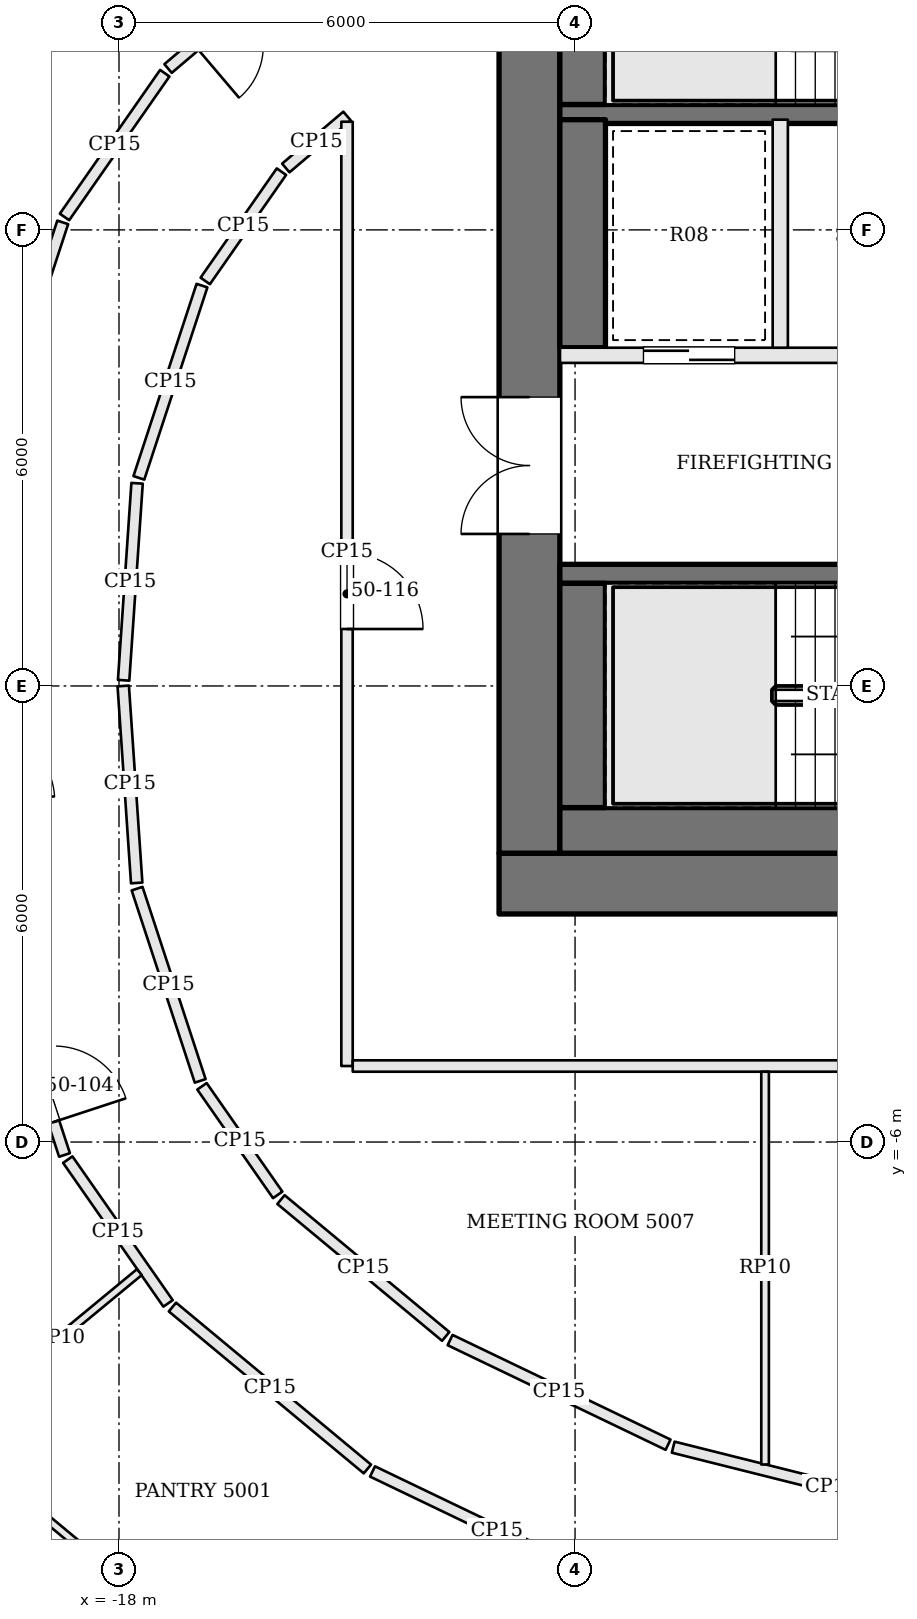
"""IFC4 building model, lengths in metres.
Left out: names, types, materials, properties, quantities, classifications, styles, units other than length and angle.
Written with IfcOpenShell. Run it as: python <this file> out.ifc"""

import sys

from ifc_helpers import new_model, si_unit, direction, frame, frame_2d, origin, place, context, subcontext, project, spatial, rectangle, extrude, element, fill, save


model = new_model("IFC4")
c1 = context("Model", 3, precision=1e-05, world=origin(), true_north=direction((0.0, 1.0)))
c2 = subcontext(c1, "Body", "Model", "MODEL_VIEW")
j1 = project(units=[si_unit("LENGTHUNIT", "METRE"), si_unit("PLANEANGLEUNIT", "RADIAN")], contexts=[c1])
p1 = place(None, origin())
s1 = spatial("IfcSite", under=j1, at=p1, CompositionType="ELEMENT")
p2 = place(p1, origin())
s2 = spatial("IfcBuilding", under=s1, at=p2, CompositionType="ELEMENT")
p3 = place(p2, frame((0.0, 0.0, 205.2)))
s3 = spatial("IfcBuildingStorey", under=s2, at=p3, CompositionType="ELEMENT", Elevation=205.2)
p4 = place(p3, frame((-13.0, -2.6, 0.0), z_axis=(0.0, 0.0, 1.0), x_axis=(1.0, 0.0, 0.0)))
e1 = element("IfcWall", 1, at=p4, inside=s3, PredefinedType="SHEAR", context=c2, shape_type="SweptSolid", body=[
    extrude(rectangle(XDim=26.0, YDim=0.8, at=frame_2d((13.0, 0.0))), origin(), (0.0, 0.0, 1.0), 3.9),
])
p5 = place(p4, frame((8.925, 0.0, 0.0)))
e2 = element("IfcOpeningElement", 2, at=p5, cuts=e1, PredefinedType="OPENING", context=c2, shape_type="SweptSolid", body=[
    extrude(rectangle(XDim=0.9, YDim=2.1, at=frame_2d((0.45, 1.05))), frame((0.0, 0.41, 0.0), z_axis=(0.0, -1.0, 0.0), x_axis=(1.0, 0.0, 0.0)), (0.0, 0.0, 1.0), 0.82),
])
p6 = place(p4, frame((11.475, 0.0, 0.0)))
e3 = element("IfcOpeningElement", 3, at=p6, cuts=e1, PredefinedType="OPENING", context=c2, shape_type="SweptSolid", body=[
    extrude(rectangle(XDim=0.9, YDim=2.1, at=frame_2d((0.45, 1.05))), frame((0.0, 0.41, 0.0), z_axis=(0.0, -1.0, 0.0), x_axis=(1.0, 0.0, 0.0)), (0.0, 0.0, 1.0), 0.82),
])
p7 = place(p4, frame((13.6, 0.0, 0.0)))
e4 = element("IfcOpeningElement", 4, at=p7, cuts=e1, PredefinedType="OPENING", context=c2, shape_type="SweptSolid", body=[
    extrude(rectangle(XDim=1.0, YDim=2.1, at=frame_2d((0.5, 1.05))), frame((0.0, 0.41, 0.0), z_axis=(0.0, -1.0, 0.0), x_axis=(1.0, 0.0, 0.0)), (0.0, 0.0, 1.0), 0.82),
])
p8 = place(p4, frame((15.95, 0.0, 0.0)))
e5 = element("IfcOpeningElement", 5, at=p8, cuts=e1, PredefinedType="OPENING", context=c2, shape_type="SweptSolid", body=[
    extrude(rectangle(XDim=1.0, YDim=2.1, at=frame_2d((0.5, 1.05))), frame((0.0, 0.41, 0.0), z_axis=(0.0, -1.0, 0.0), x_axis=(1.0, 0.0, 0.0)), (0.0, 0.0, 1.0), 0.82),
])
p9 = place(p3, frame((-12.6, -2.2, 0.0), z_axis=(0.0, 0.0, 1.0), x_axis=(0.0, 1.0, 0.0)))
e6 = element("IfcWall", 6, at=p9, inside=s3, PredefinedType="SHEAR", context=c2, shape_type="SweptSolid", body=[
    extrude(rectangle(XDim=13.4, YDim=0.8, at=frame_2d((6.7, 0.0))), origin(), (0.0, 0.0, 1.0), 3.9),
])
p10 = place(p9, frame((4.2, 0.0, 0.0)))
e7 = element("IfcOpeningElement", 7, at=p10, cuts=e6, PredefinedType="OPENING", context=c2, shape_type="SweptSolid", body=[
    extrude(rectangle(XDim=1.8, YDim=2.1, at=frame_2d((0.9, 1.05))), frame((0.0, 0.41, 0.0), z_axis=(0.0, -1.0, 0.0), x_axis=(1.0, 0.0, 0.0)), (0.0, 0.0, 1.0), 0.82),
])
p11 = place(p3, frame((-12.2, 1.475, 0.0), z_axis=(0.0, 0.0, 1.0), x_axis=(1.0, 0.0, 0.0)))
e8 = element("IfcWall", 8, at=p11, inside=s3, PredefinedType="SOLIDWALL", context=c2, shape_type="SweptSolid", body=[
    extrude(rectangle(XDim=7.1, YDim=0.25, at=frame_2d((3.55, 0.0))), origin(), (0.0, 0.0, 1.0), 3.7),
])
p12 = place(p11, frame((5.8, 0.0, 0.0)))
e9 = element("IfcOpeningElement", 9, at=p12, cuts=e8, PredefinedType="OPENING", context=c2, shape_type="SweptSolid", body=[
    extrude(rectangle(XDim=1.2, YDim=2.1, at=frame_2d((0.6, 1.05))), frame((0.0, 0.135, 0.0), z_axis=(0.0, -1.0, 0.0), x_axis=(1.0, 0.0, 0.0)), (0.0, 0.0, 1.0), 0.27),
])
p13 = place(p3, frame((-12.2, 4.35, 0.0), z_axis=(0.0, 0.0, 1.0), x_axis=(1.0, 0.0, 0.0)))
e10 = element("IfcWall", 10, at=p13, inside=s3, PredefinedType="SOLIDWALL", context=c2, shape_type="SweptSolid", body=[
    extrude(rectangle(XDim=7.1, YDim=0.2, at=frame_2d((3.55, 0.0))), origin(), (0.0, 0.0, 1.0), 3.7),
])
p14 = place(p13, frame((4.4, 0.0, 0.0)))
e11 = element("IfcOpeningElement", 11, at=p14, cuts=e10, PredefinedType="OPENING", context=c2, shape_type="SweptSolid", body=[
    extrude(rectangle(XDim=1.2, YDim=2.1, at=frame_2d((0.6, 1.05))), frame((0.0, 0.11, 0.0), z_axis=(0.0, -1.0, 0.0), x_axis=(1.0, 0.0, 0.0)), (0.0, 0.0, 1.0), 0.22),
])
p15 = place(p13, frame((1.1, 0.0, 0.0)))
e12 = element("IfcOpeningElement", 12, at=p15, cuts=e10, PredefinedType="OPENING", context=c2, shape_type="SweptSolid", body=[
    extrude(rectangle(XDim=1.2, YDim=2.1, at=frame_2d((0.6, 1.05))), frame((0.0, 0.11, 0.0), z_axis=(0.0, -1.0, 0.0), x_axis=(1.0, 0.0, 0.0)), (0.0, 0.0, 1.0), 0.22),
])
p16 = place(p3, frame((-12.2, 7.525, 0.0), z_axis=(0.0, 0.0, 1.0), x_axis=(1.0, 0.0, 0.0)))
e13 = element("IfcWall", 13, at=p16, inside=s3, PredefinedType="SOLIDWALL", context=c2, shape_type="SweptSolid", body=[
    extrude(rectangle(XDim=7.1, YDim=0.25, at=frame_2d((3.55, 0.0))), origin(), (0.0, 0.0, 1.0), 3.7),
])
p17 = place(p16, frame((5.8, 0.0, 0.0)))
e14 = element("IfcOpeningElement", 14, at=p17, cuts=e13, PredefinedType="OPENING", context=c2, shape_type="SweptSolid", body=[
    extrude(rectangle(XDim=1.2, YDim=2.1, at=frame_2d((0.6, 1.05))), frame((0.0, 0.135, 0.0), z_axis=(0.0, -1.0, 0.0), x_axis=(1.0, 0.0, 0.0)), (0.0, 0.0, 1.0), 0.27),
])
p18 = place(p3, frame((-9.3, 4.45, 0.0), z_axis=(0.0, 0.0, 1.0), x_axis=(0.0, 1.0, 0.0)))
e15 = element("IfcWall", 15, at=p18, inside=s3, PredefinedType="SOLIDWALL", context=c2, shape_type="SweptSolid", body=[
    extrude(rectangle(XDim=3.0, YDim=0.2, at=frame_2d((1.5, 0.0))), origin(), (0.0, 0.0, 1.0), 3.7),
])
p19 = place(p3, frame((-12.2, -1.9, 0.0), z_axis=(0.0, 0.0, 1.0), x_axis=(1.0, 0.0, 0.0)))
e16 = element("IfcWall", 16, at=p19, inside=s3, PredefinedType="SOLIDWALL", context=c2, shape_type="SweptSolid", body=[
    extrude(rectangle(XDim=7.1, YDim=0.6, at=frame_2d((3.55, 0.0))), origin(), (0.0, 0.0, 1.0), 3.7),
])
p20 = place(p3, frame((-11.9, -1.6, 0.0), z_axis=(0.0, 0.0, 1.0), x_axis=(0.0, 1.0, 0.0)))
e17 = element("IfcWall", 17, at=p20, inside=s3, PredefinedType="SOLIDWALL", context=c2, shape_type="SweptSolid", body=[
    extrude(rectangle(XDim=2.95, YDim=0.6, at=frame_2d((1.475, 0.0))), origin(), (0.0, 0.0, 1.0), 3.7),
])
p21 = place(p3, frame((-11.9, 4.45, 0.0), z_axis=(0.0, 0.0, 1.0), x_axis=(0.0, 1.0, 0.0)))
e18 = element("IfcWall", 18, at=p21, inside=s3, PredefinedType="SOLIDWALL", context=c2, shape_type="SweptSolid", body=[
    extrude(rectangle(XDim=3.0, YDim=0.6, at=frame_2d((1.5, 0.0))), origin(), (0.0, 0.0, 1.0), 3.7),
])
p22 = place(p3, frame((-11.9, 7.65, 0.0), z_axis=(0.0, 0.0, 1.0), x_axis=(0.0, 1.0, 0.0)))
e19 = element("IfcWall", 19, at=p22, inside=s3, PredefinedType="SOLIDWALL", context=c2, shape_type="SweptSolid", body=[
    extrude(rectangle(XDim=2.95, YDim=0.6, at=frame_2d((1.475, 0.0))), origin(), (0.0, 0.0, 1.0), 3.7),
])
p23 = place(p3, frame((-15.057, 10.073, 0.0), z_axis=(0.0, 0.0, 1.0), x_axis=(-0.762398905861, -0.647107339119, 0.0)))
e20 = element("IfcWall", 20, at=p23, inside=s3, PredefinedType="PARTITIONING", context=c2, shape_type="SweptSolid", body=[
    extrude(rectangle(XDim=3.013, YDim=0.15, at=frame_2d((1.507, 0.0))), origin(), (0.0, 0.0, 1.0), 3.084),
])
p24 = place(p23, frame((0.75, 0.0, 0.0)))
e21 = element("IfcOpeningElement", 21, at=p24, cuts=e20, PredefinedType="OPENING", context=c2, shape_type="SweptSolid", body=[
    extrude(rectangle(XDim=1.8, YDim=2.1, at=frame_2d((0.9, 1.05))), frame((0.0, 0.085, 0.0), z_axis=(0.0, -1.0, 0.0), x_axis=(1.0, 0.0, 0.0)), (0.0, 0.0, 1.0), 0.17),
])
p25 = place(p3, frame((-17.397, 8.062, 0.0), z_axis=(0.0, 0.0, 1.0), x_axis=(-0.572118665737, -0.820170855563, 0.0)))
e22 = element("IfcWall", 22, at=p25, inside=s3, PredefinedType="PARTITIONING", context=c2, shape_type="SweptSolid", body=[
    extrude(rectangle(XDim=2.306, YDim=0.15, at=frame_2d((1.153, 0.0))), origin(), (0.0, 0.0, 1.0), 3.084),
])
p26 = place(p3, frame((-18.74, 6.099, 0.0), z_axis=(0.0, 0.0, 1.0), x_axis=(-0.31188427026, -0.950120098706, 0.0)))
e23 = element("IfcWall", 23, at=p26, inside=s3, PredefinedType="PARTITIONING", context=c2, shape_type="SweptSolid", body=[
    extrude(rectangle(XDim=3.206, YDim=0.15, at=frame_2d((1.603, 0.0))), origin(), (0.0, 0.0, 1.0), 3.084),
])
p27 = place(p3, frame((-19.717, -3.124, 0.0), z_axis=(0.0, 0.0, 1.0), x_axis=(0.31188427026, -0.950120098706, 0.0)))
e24 = element("IfcWall", 24, at=p27, inside=s3, PredefinedType="PARTITIONING", context=c2, shape_type="SweptSolid", body=[
    extrude(rectangle(XDim=3.206, YDim=0.15, at=frame_2d((1.603, 0.0))), origin(), (0.0, 0.0, 1.0), 3.084),
])
p28 = place(p27, frame((1.75, 0.0, 0.0)))
e25 = element("IfcOpeningElement", 25, at=p28, cuts=e24, PredefinedType="OPENING", context=c2, shape_type="SweptSolid", body=[
    extrude(rectangle(XDim=1.0, YDim=2.4, at=frame_2d((0.5, 1.2))), frame((0.0, 0.085, 0.0), z_axis=(0.0, -1.0, 0.0), x_axis=(1.0, 0.0, 0.0)), (0.0, 0.0, 1.0), 0.17),
])
p29 = place(p3, frame((-18.674, -6.232, 0.0), z_axis=(0.0, 0.0, 1.0), x_axis=(0.572118665737, -0.820170855563, 0.0)))
e26 = element("IfcWall", 26, at=p29, inside=s3, PredefinedType="PARTITIONING", context=c2, shape_type="SweptSolid", body=[
    extrude(rectangle(XDim=2.306, YDim=0.15, at=frame_2d((1.153, 0.0))), origin(), (0.0, 0.0, 1.0), 3.084),
])
p30 = place(p3, frame((-17.297, -8.171, 0.0), z_axis=(0.0, 0.0, 1.0), x_axis=(0.769228575061, -0.638973707839, 0.0)))
e27 = element("IfcWall", 27, at=p30, inside=s3, PredefinedType="PARTITIONING", context=c2, shape_type="SweptSolid", body=[
    extrude(rectangle(XDim=3.334, YDim=0.15, at=frame_2d((1.667, 0.0))), origin(), (0.0, 0.0, 1.0), 3.084),
])
p31 = place(p3, frame((-14.664, -10.334, 0.0), z_axis=(0.0, 0.0, 1.0), x_axis=(0.901507315282, -0.432763862278, 0.0)))
e28 = element("IfcWall", 28, at=p31, inside=s3, PredefinedType="PARTITIONING", context=c2, shape_type="SweptSolid", body=[
    extrude(rectangle(XDim=3.63, YDim=0.15, at=frame_2d((1.815, 0.0))), origin(), (0.0, 0.0, 1.0), 3.084),
])
p32 = place(p3, frame((-6.553, -11.056, 0.0), z_axis=(0.0, 0.0, 1.0), x_axis=(-0.970004917182, 0.243085294995, 0.0)))
e29 = element("IfcWall", 29, at=p32, inside=s3, PredefinedType="PARTITIONING", context=c2, shape_type="SweptSolid", body=[
    extrude(rectangle(XDim=4.284, YDim=0.15, at=frame_2d((2.142, 0.0))), origin(), (0.0, 0.0, 1.0), 3.084),
])
p33 = place(p3, frame((-10.776, -9.982, 0.0), z_axis=(0.0, 0.0, 1.0), x_axis=(-0.901511079436, 0.432756020933, 0.0)))
e30 = element("IfcWall", 30, at=p33, inside=s3, PredefinedType="PARTITIONING", context=c2, shape_type="SweptSolid", body=[
    extrude(rectangle(XDim=3.181, YDim=0.15, at=frame_2d((1.59, 0.0))), origin(), (0.0, 0.0, 1.0), 3.084),
])
p34 = place(p3, frame((-13.702, -8.557, 0.0), z_axis=(0.0, 0.0, 1.0), x_axis=(-0.769221825067, 0.638981833733, 0.0)))
e31 = element("IfcWall", 31, at=p34, inside=s3, PredefinedType="PARTITIONING", context=c2, shape_type="SweptSolid", body=[
    extrude(rectangle(XDim=2.817, YDim=0.15, at=frame_2d((1.409, 0.0))), origin(), (0.0, 0.0, 1.0), 3.084),
])
p35 = place(p3, frame((-15.912, -6.696, 0.0), z_axis=(0.0, 0.0, 1.0), x_axis=(-0.572078533763, 0.820198848578, 0.0)))
e32 = element("IfcWall", 32, at=p35, inside=s3, PredefinedType="PARTITIONING", context=c2, shape_type="SweptSolid", body=[
    extrude(rectangle(XDim=1.742, YDim=0.15, at=frame_2d((0.871, 0.0))), origin(), (0.0, 0.0, 1.0), 3.084),
])
p36 = place(p3, frame((-16.932, -5.196, 0.0), z_axis=(0.0, 0.0, 1.0), x_axis=(-0.311904957484, 0.950113307715, 0.0)))
e33 = element("IfcWall", 33, at=p36, inside=s3, PredefinedType="PARTITIONING", context=c2, shape_type="SweptSolid", body=[
    extrude(rectangle(XDim=2.662, YDim=0.15, at=frame_2d((1.331, 0.0))), origin(), (0.0, 0.0, 1.0), 3.084),
])
p37 = place(p3, frame((-17.767, -2.592, 0.0), z_axis=(0.0, 0.0, 1.0), x_axis=(-0.068140828228, 0.997675712608, 0.0)))
e34 = element("IfcWall", 34, at=p37, inside=s3, PredefinedType="PARTITIONING", context=c2, shape_type="SweptSolid", body=[
    extrude(rectangle(XDim=2.598, YDim=0.15, at=frame_2d((1.299, 0.0))), origin(), (0.0, 0.0, 1.0), 3.084),
])
p38 = place(p3, frame((-17.939, 0.075, 0.0), z_axis=(0.0, 0.0, 1.0), x_axis=(0.068227980697, 0.997669756307, 0.0)))
e35 = element("IfcWall", 35, at=p38, inside=s3, PredefinedType="PARTITIONING", context=c2, shape_type="SweptSolid", body=[
    extrude(rectangle(XDim=2.598, YDim=0.15, at=frame_2d((1.299, 0.0))), origin(), (0.0, 0.0, 1.0), 3.084),
])
p39 = place(p3, frame((-17.739, 2.738, 0.0), z_axis=(0.0, 0.0, 1.0), x_axis=(0.311904957484, 0.950113307715, 0.0)))
e36 = element("IfcWall", 36, at=p39, inside=s3, PredefinedType="PARTITIONING", context=c2, shape_type="SweptSolid", body=[
    extrude(rectangle(XDim=2.662, YDim=0.15, at=frame_2d((1.331, 0.0))), origin(), (0.0, 0.0, 1.0), 3.084),
])
p40 = place(p3, frame((-16.865, 5.329, 0.0), z_axis=(0.0, 0.0, 1.0), x_axis=(0.572096615639, 0.820186236397, 0.0)))
e37 = element("IfcWall", 37, at=p40, inside=s3, PredefinedType="PARTITIONING", context=c2, shape_type="SweptSolid", body=[
    extrude(rectangle(XDim=1.753, YDim=0.15, at=frame_2d((0.876, 0.0))), origin(), (0.0, 0.0, 1.0), 3.084),
])
p41 = place(p3, frame((-15.805, 6.814, 0.0), z_axis=(0.0, 0.0, 1.0), x_axis=(0.762298381233, 0.647225755027, 0.0)))
e38 = element("IfcWall", 38, at=p41, inside=s3, PredefinedType="PARTITIONING", context=c2, shape_type="SweptSolid", body=[
    extrude(rectangle(XDim=1.057, YDim=0.15, at=frame_2d((0.528, 0.0))), origin(), (0.0, 0.0, 1.0), 3.084),
])
p42 = place(p3, frame((-15.0, 7.423, 0.0), z_axis=(0.0, 0.0, 1.0), x_axis=(0.0, -1.0, 0.0)))
e39 = element("IfcWall", 39, at=p42, inside=s3, PredefinedType="PARTITIONING", context=c2, shape_type="SweptSolid", body=[
    extrude(rectangle(XDim=12.423, YDim=0.15, at=frame_2d((6.211, 0.0))), origin(), (0.0, 0.0, 1.0), 3.084),
])
p43 = place(p42, frame((5.674, 0.0, 0.0)))
e40 = element("IfcOpeningElement", 40, at=p43, cuts=e39, PredefinedType="OPENING", context=c2, shape_type="SweptSolid", body=[
    extrude(rectangle(XDim=1.0, YDim=2.4, at=frame_2d((0.5, 1.2))), frame((0.0, 0.085, 0.0), z_axis=(0.0, -1.0, 0.0), x_axis=(1.0, 0.0, 0.0)), (0.0, 0.0, 1.0), 0.17),
])
p44 = place(p3, frame((-14.925, -5.0, 0.0), z_axis=(0.0, 0.0, 1.0), x_axis=(1.0, 0.0, 0.0)))
e41 = element("IfcWall", 41, at=p44, inside=s3, PredefinedType="PARTITIONING", context=c2, shape_type="SweptSolid", body=[
    extrude(rectangle(XDim=29.925, YDim=0.15, at=frame_2d((14.962, 0.0))), origin(), (0.0, 0.0, 1.0), 3.084),
])
p45 = place(p44, frame((14.025, 0.0, 0.0)))
e42 = element("IfcOpeningElement", 42, at=p45, cuts=e41, PredefinedType="OPENING", context=c2, shape_type="SweptSolid", body=[
    extrude(rectangle(XDim=1.8, YDim=2.1, at=frame_2d((0.9, 1.05))), frame((0.0, 0.085, 0.0), z_axis=(0.0, -1.0, 0.0), x_axis=(1.0, 0.0, 0.0)), (0.0, 0.0, 1.0), 0.17),
])
p46 = place(p3, frame((-16.511, -12.983, 0.0), z_axis=(0.0, 0.0, 1.0), x_axis=(-0.769227332821, 0.638975203307, 0.0)))
e43 = element("IfcWall", 43, at=p46, inside=s3, PredefinedType="PARTITIONING", context=c2, shape_type="SweptSolid", body=[
    extrude(rectangle(XDim=3.696, YDim=0.1, at=frame_2d((1.848, 0.0))), origin(), (0.0, 0.0, 1.0), 3.084),
])
p47 = place(p3, frame((-17.733, -7.712, 0.0), z_axis=(0.0, 0.0, 1.0), x_axis=(-0.771096712333, -0.636718038247, 0.0)))
e44 = element("IfcWall", 44, at=p47, inside=s3, PredefinedType="PARTITIONING", context=c2, shape_type="SweptSolid", body=[
    extrude(rectangle(XDim=2.741, YDim=0.1, at=frame_2d((1.371, 0.0))), origin(), (0.0, 0.0, 1.0), 3.084),
])
p48 = place(p3, frame((-9.5, -10.242, 0.0), z_axis=(0.0, 0.0, 1.0), x_axis=(0.0, 1.0, 0.0)))
e45 = element("IfcWall", 45, at=p48, inside=s3, PredefinedType="PARTITIONING", context=c2, shape_type="SweptSolid", body=[
    extrude(rectangle(XDim=5.167, YDim=0.1, at=frame_2d((2.583, 0.0))), origin(), (0.0, 0.0, 1.0), 3.084),
])
p49 = place(p10, origin())
e46 = element("IfcDoor", 46, at=p49, inside=s3, OperationType="DOUBLE_DOOR_SINGLE_SWING", PredefinedType="DOOR", context=c2, shape_type="SweptSolid", body=[
    extrude(rectangle(XDim=1.8, YDim=2.1, at=frame_2d((0.9, 1.05))), frame((0.0, 0.025, 0.0), z_axis=(0.0, -1.0, 0.0), x_axis=(1.0, 0.0, 0.0)), (0.0, 0.0, 1.0), 0.05),
])
fill(e7, e46)
p50 = place(p15, origin())
e47 = element("IfcDoor", 47, at=p50, inside=s3, OperationType="SLIDING_TO_RIGHT", PredefinedType="DOOR", context=c2, shape_type="SweptSolid", body=[
    extrude(rectangle(XDim=1.2, YDim=2.1, at=frame_2d((0.6, 1.05))), frame((0.0, 0.025, 0.0), z_axis=(0.0, -1.0, 0.0), x_axis=(1.0, 0.0, 0.0)), (0.0, 0.0, 1.0), 0.05),
])
fill(e12, e47)
p51 = place(p28, origin())
e48 = element("IfcDoor", 48, at=p51, inside=s3, OperationType="SINGLE_SWING_RIGHT", PredefinedType="DOOR", context=c2, shape_type="SweptSolid", body=[
    extrude(rectangle(XDim=1.0, YDim=2.4, at=frame_2d((0.5, 1.2))), frame((0.0, 0.025, 0.0), z_axis=(0.0, -1.0, 0.0), x_axis=(1.0, 0.0, 0.0)), (0.0, 0.0, 1.0), 0.05),
])
fill(e25, e48)
p52 = place(p43, origin())
e49 = element("IfcDoor", 49, at=p52, inside=s3, OperationType="SINGLE_SWING_RIGHT", PredefinedType="DOOR", context=c2, shape_type="SweptSolid", body=[
    extrude(rectangle(XDim=1.0, YDim=2.4, at=frame_2d((0.5, 1.2))), frame((0.0, 0.025, 0.0), z_axis=(0.0, -1.0, 0.0), x_axis=(1.0, 0.0, 0.0)), (0.0, 0.0, 1.0), 0.05),
])
fill(e40, e49)
save(model, sys.argv[1])
